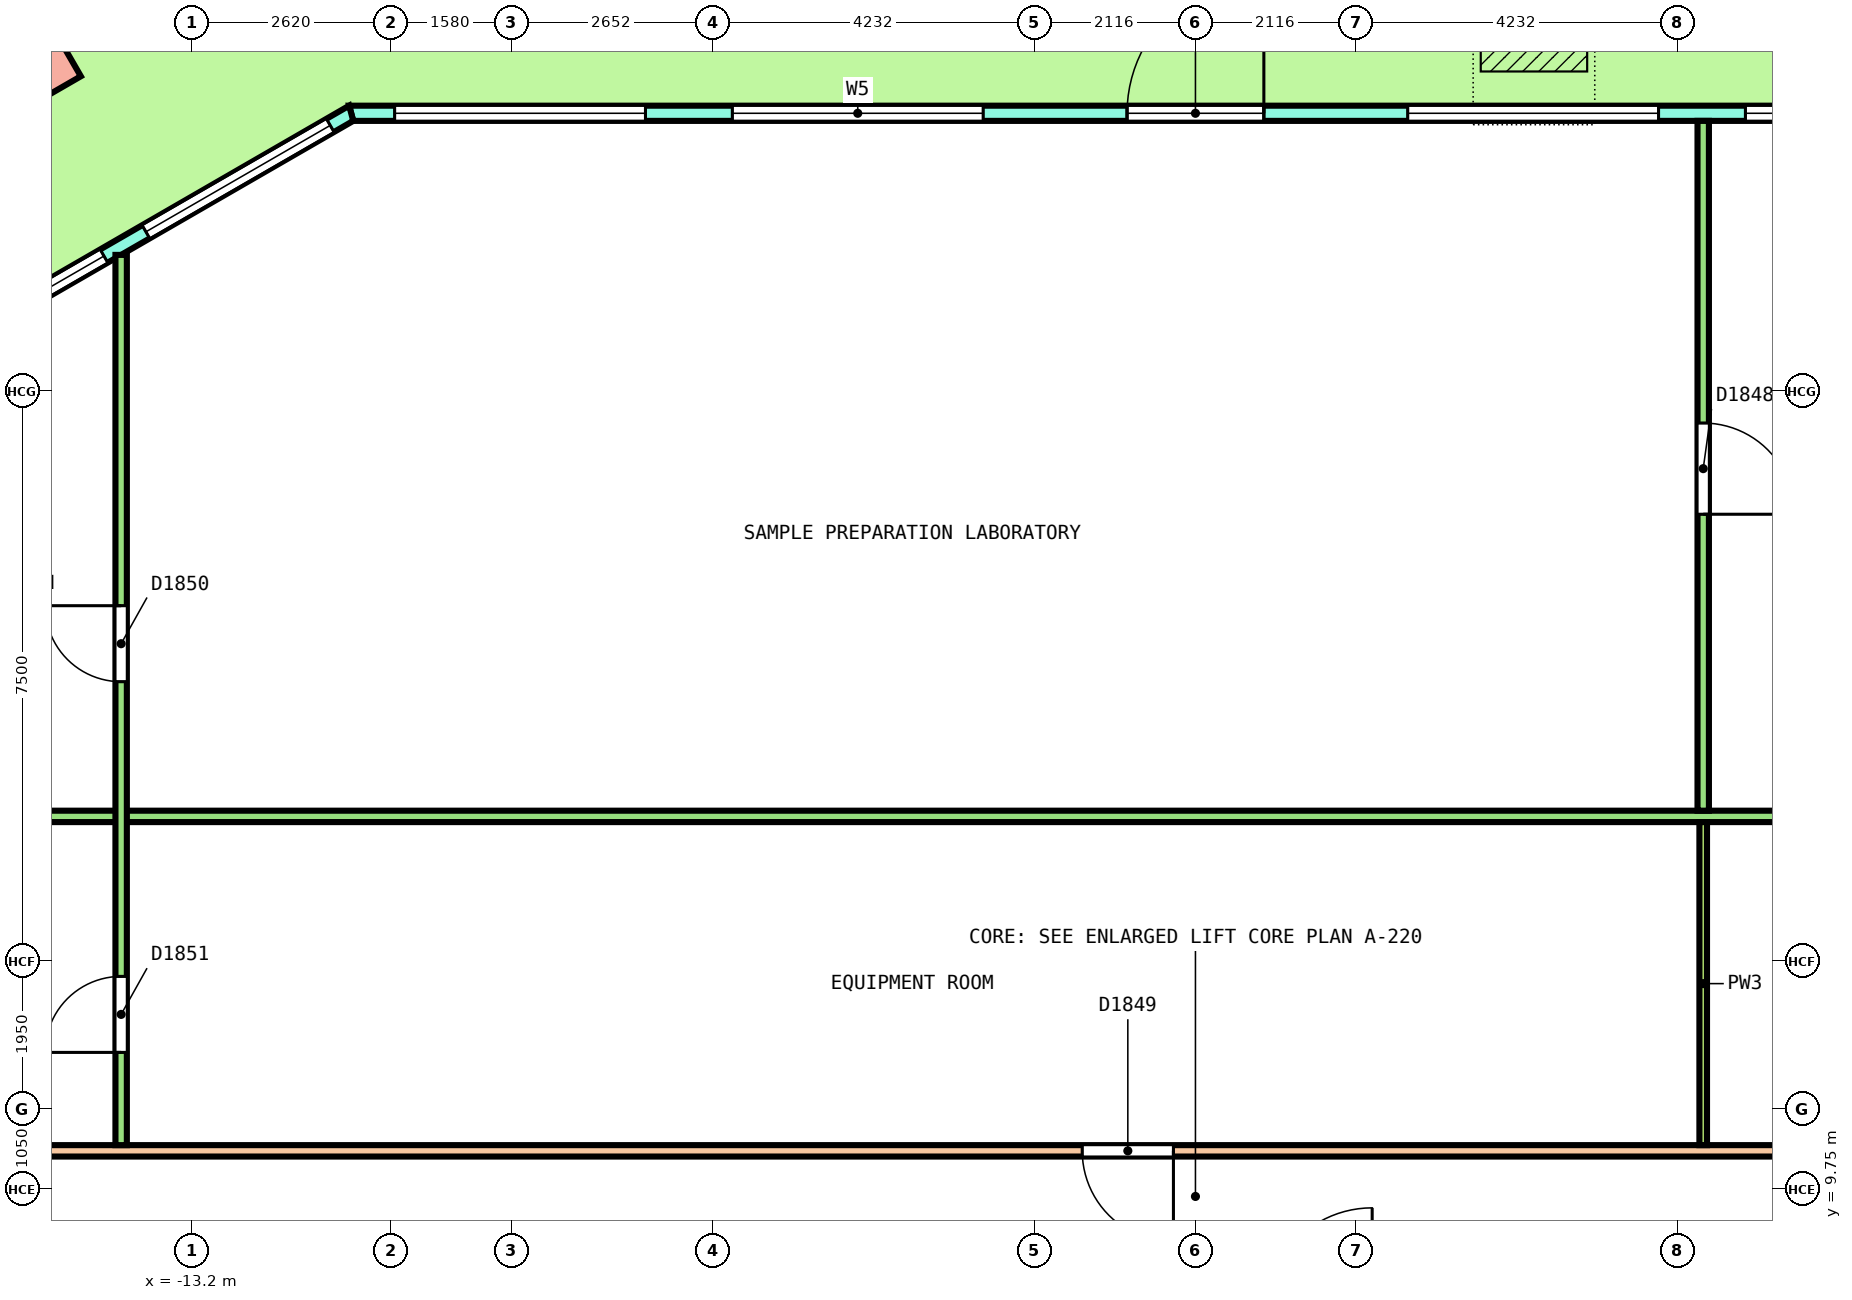
"""IFC4 building model, lengths in metres.
Left out: names, types, materials, properties, quantities, classifications, styles, units other than length and angle.
Written with IfcOpenShell. Run it as: python <this file> out.ifc"""

import sys

from ifc_helpers import new_model, si_unit, direction, frame, frame_2d, origin, origin_2d, place, context, subcontext, project, spatial, polyline, rectangle, outline, extrude, element, fill, save


model = new_model("IFC4")
c1 = context("Model", 3, precision=1e-05, world=origin(), true_north=direction((0.0, 1.0)))
c2 = subcontext(c1, "Body", "Model", "MODEL_VIEW")
j1 = project(units=[si_unit("LENGTHUNIT", "METRE"), si_unit("PLANEANGLEUNIT", "RADIAN")], contexts=[c1])
p1 = place(None, origin())
s1 = spatial("IfcSite", under=j1, at=p1, CompositionType="ELEMENT")
p2 = place(p1, origin())
s2 = spatial("IfcBuilding", under=s1, at=p2, CompositionType="ELEMENT")
p3 = place(p2, frame((0.0, 0.0, 180.4)))
s3 = spatial("IfcBuildingStorey", under=s2, at=p3, CompositionType="ELEMENT", Elevation=180.4)
p4 = place(p3, frame((-15.484, 24.606, 0.0), z_axis=(-0.036265236264, 0.0, 0.999342199969), x_axis=(-0.865313546461, -0.500246354177, -0.031401456084)))
e1 = element("IfcColumn", 1, at=p4, inside=s3, PredefinedType="COLUMN", context=c2, shape_type="SweptSolid", body=[
    extrude(rectangle(XDim=1.2, YDim=1.2, at=origin_2d()), origin(), (0.0, 0.0, 1.0), 4.053),
])
p5 = place(p3, frame((11.107, 23.9, 0.0), z_axis=(0.0, 0.0, 1.0), x_axis=(-1.0, 0.0, 0.0)))
e2 = element("IfcWall", 2, at=p5, inside=s3, PredefinedType="SOLIDWALL", context=c2, shape_type="SweptSolid", body=[
    extrude(outline(polyline([(-0.027, -0.1), (0.985, -0.1), (1.998, -0.1), (3.01, -0.1), (4.022, -0.1), (5.034, -0.1), (6.046, -0.1), (7.058, -0.1), (8.071, -0.1), (9.083, -0.1), (10.095, -0.1), (11.107, -0.1), (12.119, -0.1), (13.131, -0.1), (14.143, -0.1), (15.156, -0.1), (16.168, -0.1), (17.18, -0.1), (18.192, -0.1), (19.204, -0.1), (20.216, -0.1), (21.229, -0.1), (22.241, -0.1), (22.187, 0.1), (21.18, 0.1), (20.172, 0.1), (19.165, 0.1), (18.158, 0.1), (17.151, 0.1), (16.143, 0.1), (15.136, 0.1), (14.129, 0.1), (13.122, 0.1), (12.114, 0.1), (11.107, 0.1), (10.1, 0.1), (9.092, 0.1), (8.085, 0.1), (7.078, 0.1), (6.071, 0.1), (5.063, 0.1), (4.056, 0.1), (3.049, 0.1), (2.042, 0.1), (1.034, 0.1), (0.027, 0.1), (-0.027, -0.1)])), origin(), (0.0, 0.0, 1.0), 4.1),
])
p6 = place(p5, frame((0.571, 0.0, 0.1)))
e3 = element("IfcOpeningElement", 3, at=p6, cuts=e2, PredefinedType="OPENING", context=c2, shape_type="SweptSolid", body=[
    extrude(rectangle(XDim=3.3, YDim=2.9, at=frame_2d((1.65, 1.45))), frame((0.0, 0.11, 0.0), z_axis=(0.0, -1.0, 0.0), x_axis=(1.0, 0.0, 0.0)), (0.0, 0.0, 1.0), 0.22),
])
p7 = place(p5, frame((5.014, 0.0, 0.1)))
e4 = element("IfcOpeningElement", 4, at=p7, cuts=e2, PredefinedType="OPENING", context=c2, shape_type="SweptSolid", body=[
    extrude(rectangle(XDim=3.3, YDim=2.9, at=frame_2d((1.65, 1.45))), frame((0.0, 0.11, 0.0), z_axis=(0.0, -1.0, 0.0), x_axis=(1.0, 0.0, 0.0)), (0.0, 0.0, 1.0), 0.22),
])
p8 = place(p5, frame((10.207, 0.0, 0.0)))
e5 = element("IfcOpeningElement", 5, at=p8, cuts=e2, PredefinedType="OPENING", context=c2, shape_type="SweptSolid", body=[
    extrude(rectangle(XDim=1.8, YDim=2.4, at=frame_2d((0.9, 1.2))), frame((0.0, 0.11, 0.0), z_axis=(0.0, -1.0, 0.0), x_axis=(1.0, 0.0, 0.0)), (0.0, 0.0, 1.0), 0.22),
])
p9 = place(p5, frame((10.207, 0.0, 2.55)))
e6 = element("IfcOpeningElement", 6, at=p9, cuts=e2, PredefinedType="OPENING", context=c2, shape_type="SweptSolid", body=[
    extrude(rectangle(XDim=1.8, YDim=0.45, at=frame_2d((0.9, 0.225))), frame((0.0, 0.11, 0.0), z_axis=(0.0, -1.0, 0.0), x_axis=(1.0, 0.0, 0.0)), (0.0, 0.0, 1.0), 0.22),
])
p10 = place(p5, frame((13.9, 0.0, 0.1)))
e7 = element("IfcOpeningElement", 7, at=p10, cuts=e2, PredefinedType="OPENING", context=c2, shape_type="SweptSolid", body=[
    extrude(rectangle(XDim=3.3, YDim=2.9, at=frame_2d((1.65, 1.45))), frame((0.0, 0.11, 0.0), z_axis=(0.0, -1.0, 0.0), x_axis=(1.0, 0.0, 0.0)), (0.0, 0.0, 1.0), 0.22),
])
p11 = place(p5, frame((18.343, 0.0, 0.1)))
e8 = element("IfcOpeningElement", 8, at=p11, cuts=e2, PredefinedType="OPENING", context=c2, shape_type="SweptSolid", body=[
    extrude(rectangle(XDim=3.3, YDim=2.9, at=frame_2d((1.65, 1.45))), frame((0.0, 0.11, 0.0), z_axis=(0.0, -1.0, 0.0), x_axis=(1.0, 0.0, 0.0)), (0.0, 0.0, 1.0), 0.22),
])
p12 = place(p3, frame((-11.107, 23.9, 0.0), z_axis=(0.0, 0.0, 1.0), x_axis=(-0.866029458321, -0.49999297727, 0.0)))
e9 = element("IfcWall", 9, at=p12, inside=s3, PredefinedType="SOLIDWALL", context=c2, shape_type="SweptSolid", body=[
    extrude(outline(polyline([(-0.027, -0.1), (1.128, -0.1), (2.282, -0.1), (3.437, -0.1), (4.592, -0.1), (5.747, -0.1), (6.901, -0.1), (6.848, 0.1), (5.711, 0.1), (4.574, 0.1), (3.437, 0.1), (2.301, 0.1), (1.164, 0.1), (0.027, 0.1), (-0.027, -0.1)])), origin(), (0.0, 0.0, 1.0), 4.1),
])
p13 = place(p12, frame((0.319, 0.0, 0.1)))
e10 = element("IfcOpeningElement", 10, at=p13, cuts=e9, PredefinedType="OPENING", context=c2, shape_type="SweptSolid", body=[
    extrude(rectangle(XDim=2.8, YDim=2.9, at=frame_2d((1.4, 1.45))), frame((0.0, 0.11, 0.0), z_axis=(0.0, -1.0, 0.0), x_axis=(1.0, 0.0, 0.0)), (0.0, 0.0, 1.0), 0.22),
])
p14 = place(p12, frame((3.756, 0.0, 0.1)))
e11 = element("IfcOpeningElement", 11, at=p14, cuts=e9, PredefinedType="OPENING", context=c2, shape_type="SweptSolid", body=[
    extrude(rectangle(XDim=2.8, YDim=2.9, at=frame_2d((1.4, 1.45))), frame((0.0, 0.11, 0.0), z_axis=(0.0, -1.0, 0.0), x_axis=(1.0, 0.0, 0.0)), (0.0, 0.0, 1.0), 0.22),
])
p15 = place(p3, frame((-15.275, 10.25, 0.0), z_axis=(0.0, 0.0, 1.0), x_axis=(1.0, 0.0, 0.0)))
e12 = element("IfcWall", 12, at=p15, inside=s3, PredefinedType="PARTITIONING", context=c2, shape_type="SweptSolid", body=[
    extrude(rectangle(XDim=30.55, YDim=0.15, at=frame_2d((15.275, 0.0))), origin(), (0.0, 0.0, 1.0), 3.05),
])
p16 = place(p15, frame((26.836, 0.0, 0.0)))
e13 = element("IfcOpeningElement", 13, at=p16, cuts=e12, PredefinedType="OPENING", context=c2, shape_type="SweptSolid", body=[
    extrude(rectangle(XDim=1.0, YDim=2.1, at=frame_2d((0.5, 1.05))), frame((0.0, 0.085, 0.0), z_axis=(0.0, -1.0, 0.0), x_axis=(1.0, 0.0, 0.0)), (0.0, 0.0, 1.0), 0.17),
])
p17 = place(p15, frame((13.785, 0.0, 0.0)))
e14 = element("IfcOpeningElement", 14, at=p17, cuts=e12, PredefinedType="OPENING", context=c2, shape_type="SweptSolid", body=[
    extrude(rectangle(XDim=1.2, YDim=2.1, at=frame_2d((0.6, 1.05))), frame((0.0, 0.085, 0.0), z_axis=(0.0, -1.0, 0.0), x_axis=(1.0, 0.0, 0.0)), (0.0, 0.0, 1.0), 0.17),
])
p18 = place(p3, frame((-19.675, 14.65, 0.0), z_axis=(0.0, 0.0, 1.0), x_axis=(1.0, 0.0, 0.0)))
e15 = element("IfcWall", 15, at=p18, inside=s3, PredefinedType="PARTITIONING", context=c2, shape_type="SweptSolid", body=[
    extrude(rectangle(XDim=39.5, YDim=0.15, at=frame_2d((19.75, 0.0))), origin(), (0.0, 0.0, 1.0), 3.05),
])
p19 = place(p18, frame((30.472, 0.0, 0.0)))
e16 = element("IfcOpeningElement", 16, at=p19, cuts=e15, PredefinedType="OPENING", context=c2, shape_type="SweptSolid", body=[
    extrude(rectangle(XDim=1.2, YDim=2.1, at=frame_2d((0.6, 1.05))), frame((0.0, 0.085, 0.0), z_axis=(0.0, -1.0, 0.0), x_axis=(1.0, 0.0, 0.0)), (0.0, 0.0, 1.0), 0.17),
])
p20 = place(p3, frame((6.68, 14.725, 0.0), z_axis=(0.0, 0.0, 1.0), x_axis=(0.0, 1.0, 0.0)))
e17 = element("IfcWall", 17, at=p20, inside=s3, PredefinedType="PARTITIONING", context=c2, shape_type="SweptSolid", body=[
    extrude(rectangle(XDim=9.075, YDim=0.15, at=frame_2d((4.538, 0.0))), origin(), (0.0, 0.0, 1.0), 3.05),
])
p21 = place(p20, frame((3.9, 0.0, 0.0)))
e18 = element("IfcOpeningElement", 18, at=p21, cuts=e17, PredefinedType="OPENING", context=c2, shape_type="SweptSolid", body=[
    extrude(rectangle(XDim=1.2, YDim=2.1, at=frame_2d((0.6, 1.05))), frame((0.0, 0.085, 0.0), z_axis=(0.0, -1.0, 0.0), x_axis=(1.0, 0.0, 0.0)), (0.0, 0.0, 1.0), 0.17),
])
p22 = place(p3, frame((-14.134, 10.325, 0.0), z_axis=(0.0, 0.0, 1.0), x_axis=(0.0, 1.0, 0.0)))
e19 = element("IfcWall", 19, at=p22, inside=s3, PredefinedType="PARTITIONING", context=c2, shape_type="SweptSolid", body=[
    extrude(rectangle(XDim=11.712, YDim=0.15, at=frame_2d((5.856, 0.0))), origin(), (0.0, 0.0, 1.0), 3.05),
])
p23 = place(p22, frame((6.097, 0.0, 0.0)))
e20 = element("IfcOpeningElement", 20, at=p23, cuts=e19, PredefinedType="OPENING", context=c2, shape_type="SweptSolid", body=[
    extrude(rectangle(XDim=1.0, YDim=2.1, at=frame_2d((0.5, 1.05))), frame((0.0, 0.085, 0.0), z_axis=(0.0, -1.0, 0.0), x_axis=(1.0, 0.0, 0.0)), (0.0, 0.0, 1.0), 0.17),
])
p24 = place(p22, frame((1.22, 0.0, 0.0)))
e21 = element("IfcOpeningElement", 21, at=p24, cuts=e19, PredefinedType="OPENING", context=c2, shape_type="SweptSolid", body=[
    extrude(rectangle(XDim=1.0, YDim=2.1, at=frame_2d((0.5, 1.05))), frame((0.0, 0.085, 0.0), z_axis=(0.0, -1.0, 0.0), x_axis=(1.0, 0.0, 0.0)), (0.0, 0.0, 1.0), 0.17),
])
p25 = place(p3, frame((6.68, 10.325, 0.0), z_axis=(0.0, 0.0, 1.0), x_axis=(0.0, 1.0, 0.0)))
e22 = element("IfcWall", 22, at=p25, inside=s3, PredefinedType="PARTITIONING", context=c2, shape_type="SweptSolid", body=[
    extrude(rectangle(XDim=4.25, YDim=0.1, at=frame_2d((2.125, 0.0))), origin(), (0.0, 0.0, 1.0), 3.05),
])
p26 = place(p6, origin())
e23 = element("IfcWindow", 23, at=p26, inside=s3, PartitioningType="SINGLE_PANEL", PredefinedType="WINDOW", context=c2, shape_type="SweptSolid", body=[
    extrude(rectangle(XDim=3.3, YDim=2.9, at=frame_2d((1.65, 1.45))), frame((0.0, 0.03, 0.0), z_axis=(0.0, -1.0, 0.0), x_axis=(1.0, 0.0, 0.0)), (0.0, 0.0, 1.0), 0.06),
])
fill(e3, e23)
p27 = place(p7, origin())
e24 = element("IfcWindow", 24, at=p27, inside=s3, PartitioningType="SINGLE_PANEL", PredefinedType="WINDOW", context=c2, shape_type="SweptSolid", body=[
    extrude(rectangle(XDim=3.3, YDim=2.9, at=frame_2d((1.65, 1.45))), frame((0.0, 0.03, 0.0), z_axis=(0.0, -1.0, 0.0), x_axis=(1.0, 0.0, 0.0)), (0.0, 0.0, 1.0), 0.06),
])
fill(e4, e24)
p28 = place(p8, origin())
e25 = element("IfcDoor", 25, at=p28, inside=s3, OperationType="DOUBLE_DOOR_SINGLE_SWING", PredefinedType="DOOR", context=c2, shape_type="SweptSolid", body=[
    extrude(rectangle(XDim=1.8, YDim=2.4, at=frame_2d((0.9, 1.2))), frame((0.0, 0.025, 0.0), z_axis=(0.0, -1.0, 0.0), x_axis=(1.0, 0.0, 0.0)), (0.0, 0.0, 1.0), 0.05),
])
fill(e5, e25)
p29 = place(p9, origin())
e26 = element("IfcWindow", 26, at=p29, inside=s3, PartitioningType="SINGLE_PANEL", PredefinedType="WINDOW", context=c2, shape_type="SweptSolid", body=[
    extrude(rectangle(XDim=1.8, YDim=0.45, at=frame_2d((0.9, 0.225))), frame((0.0, 0.03, 0.0), z_axis=(0.0, -1.0, 0.0), x_axis=(1.0, 0.0, 0.0)), (0.0, 0.0, 1.0), 0.06),
])
fill(e6, e26)
p30 = place(p10, origin())
e27 = element("IfcWindow", 27, at=p30, inside=s3, PartitioningType="SINGLE_PANEL", PredefinedType="WINDOW", context=c2, shape_type="SweptSolid", body=[
    extrude(rectangle(XDim=3.3, YDim=2.9, at=frame_2d((1.65, 1.45))), frame((0.0, 0.03, 0.0), z_axis=(0.0, -1.0, 0.0), x_axis=(1.0, 0.0, 0.0)), (0.0, 0.0, 1.0), 0.06),
])
fill(e7, e27)
p31 = place(p11, origin())
e28 = element("IfcWindow", 28, at=p31, inside=s3, PartitioningType="SINGLE_PANEL", PredefinedType="WINDOW", context=c2, shape_type="SweptSolid", body=[
    extrude(rectangle(XDim=3.3, YDim=2.9, at=frame_2d((1.65, 1.45))), frame((0.0, 0.03, 0.0), z_axis=(0.0, -1.0, 0.0), x_axis=(1.0, 0.0, 0.0)), (0.0, 0.0, 1.0), 0.06),
])
fill(e8, e28)
p32 = place(p13, origin())
e29 = element("IfcWindow", 29, at=p32, inside=s3, PartitioningType="SINGLE_PANEL", PredefinedType="WINDOW", context=c2, shape_type="SweptSolid", body=[
    extrude(rectangle(XDim=2.8, YDim=2.9, at=frame_2d((1.4, 1.45))), frame((0.0, 0.03, 0.0), z_axis=(0.0, -1.0, 0.0), x_axis=(1.0, 0.0, 0.0)), (0.0, 0.0, 1.0), 0.06),
])
fill(e10, e29)
p33 = place(p14, origin())
e30 = element("IfcWindow", 30, at=p33, inside=s3, PartitioningType="SINGLE_PANEL", PredefinedType="WINDOW", context=c2, shape_type="SweptSolid", body=[
    extrude(rectangle(XDim=2.8, YDim=2.9, at=frame_2d((1.4, 1.45))), frame((0.0, 0.03, 0.0), z_axis=(0.0, -1.0, 0.0), x_axis=(1.0, 0.0, 0.0)), (0.0, 0.0, 1.0), 0.06),
])
fill(e11, e30)
p34 = place(p21, origin())
e31 = element("IfcDoor", 31, at=p34, inside=s3, OperationType="DOUBLE_DOOR_SINGLE_SWING", PredefinedType="DOOR", context=c2, shape_type="SweptSolid", body=[
    extrude(rectangle(XDim=1.2, YDim=2.1, at=frame_2d((0.6, 1.05))), frame((0.0, 0.025, 0.0), z_axis=(0.0, -1.0, 0.0), x_axis=(1.0, 0.0, 0.0)), (0.0, 0.0, 1.0), 0.05),
])
fill(e18, e31)
p35 = place(p17, origin())
e32 = element("IfcDoor", 32, at=p35, inside=s3, OperationType="DOUBLE_DOOR_SINGLE_SWING", PredefinedType="DOOR", context=c2, shape_type="SweptSolid", body=[
    extrude(rectangle(XDim=1.2, YDim=2.1, at=frame_2d((0.6, 1.05))), frame((0.0, 0.025, 0.0), z_axis=(0.0, -1.0, 0.0), x_axis=(1.0, 0.0, 0.0)), (0.0, 0.0, 1.0), 0.05),
])
fill(e14, e32)
p36 = place(p23, origin())
e33 = element("IfcDoor", 33, at=p36, inside=s3, OperationType="SINGLE_SWING_RIGHT", PredefinedType="DOOR", context=c2, shape_type="SweptSolid", body=[
    extrude(rectangle(XDim=1.0, YDim=2.1, at=frame_2d((0.5, 1.05))), frame((0.0, 0.025, 0.0), z_axis=(0.0, -1.0, 0.0), x_axis=(1.0, 0.0, 0.0)), (0.0, 0.0, 1.0), 0.05),
])
fill(e20, e33)
p37 = place(p24, origin())
e34 = element("IfcDoor", 34, at=p37, inside=s3, OperationType="SINGLE_SWING_RIGHT", PredefinedType="DOOR", context=c2, shape_type="SweptSolid", body=[
    extrude(rectangle(XDim=1.0, YDim=2.1, at=frame_2d((0.5, 1.05))), frame((0.0, 0.025, 0.0), z_axis=(0.0, -1.0, 0.0), x_axis=(1.0, 0.0, 0.0)), (0.0, 0.0, 1.0), 0.05),
])
fill(e21, e34)
save(model, sys.argv[1])
